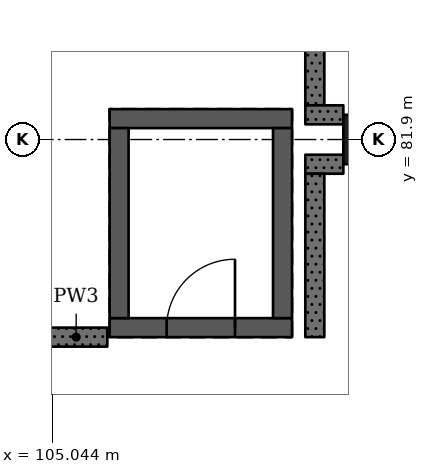
"""IFC4 building model, lengths in metres.
Left out: names, types, materials, properties, quantities, classifications, styles, units other than length and angle.
Written with IfcOpenShell. Run it as: python <this file> out.ifc"""

import sys

from ifc_helpers import new_model, si_unit, direction, frame, frame_2d, origin, origin_2d, place, context, subcontext, project, spatial, rectangle, extrude, element, fill, save


model = new_model("IFC4")
c1 = context("Model", 3, precision=1e-05, world=origin(), true_north=direction((0.0, 1.0)))
c2 = subcontext(c1, "Body", "Model", "MODEL_VIEW")
j1 = project(units=[si_unit("LENGTHUNIT", "METRE"), si_unit("PLANEANGLEUNIT", "RADIAN")], contexts=[c1])
p1 = place(None, origin())
s1 = spatial("IfcSite", under=j1, at=p1, CompositionType="ELEMENT")
p2 = place(p1, origin())
s2 = spatial("IfcBuilding", under=s1, at=p2, CompositionType="ELEMENT")
p3 = place(p2, frame((0.0, 0.0, 15.47)))
s3 = spatial("IfcBuildingStorey", under=s2, at=p3, CompositionType="ELEMENT", Elevation=15.47)
p4 = place(p3, frame((109.2, 81.9, 0.0), z_axis=(0.0, 0.0, 1.0), x_axis=(1.0, 0.0, 0.0)))
e1 = element("IfcColumn", 1, at=p4, inside=s3, PredefinedType="COLUMN", context=c2, shape_type="SweptSolid", body=[
    extrude(rectangle(XDim=0.65, YDim=0.65, at=origin_2d()), origin(), (0.0, 0.0, 1.0), 4.55),
])
p5 = place(p3, frame((108.2, 79.425, 0.0), z_axis=(0.0, 0.0, 1.0), x_axis=(-1.0, 0.0, 0.0)))
e2 = element("IfcWall", 2, at=p5, inside=s3, PredefinedType="SHEAR", context=c2, shape_type="SweptSolid", body=[
    extrude(rectangle(XDim=2.4, YDim=0.25, at=frame_2d((1.2, 0.0))), origin(), (0.0, 0.0, 1.0), 4.55),
])
p6 = place(p5, frame((0.75, 0.0, 0.0)))
e3 = element("IfcOpeningElement", 3, at=p6, cuts=e2, PredefinedType="OPENING", context=c2, shape_type="SweptSolid", body=[
    extrude(rectangle(XDim=0.9, YDim=2.1, at=frame_2d((0.45, 1.05))), frame((0.0, 0.135, 0.0), z_axis=(0.0, -1.0, 0.0), x_axis=(1.0, 0.0, 0.0)), (0.0, 0.0, 1.0), 0.27),
])
p7 = place(p3, frame((108.2, 82.175, 0.0), z_axis=(0.0, 0.0, 1.0), x_axis=(-1.0, 0.0, 0.0)))
e4 = element("IfcWall", 4, at=p7, inside=s3, PredefinedType="SHEAR", context=c2, shape_type="SweptSolid", body=[
    extrude(rectangle(XDim=2.4, YDim=0.25, at=frame_2d((1.2, 0.0))), origin(), (0.0, 0.0, 1.0), 4.55),
])
for number, where, z_axis, x_axis in (
    (5, (105.925, 82.05, 0.0), (0.0, 0.0, 1.0), (0.0, -1.0, 0.0)),
    (6, (108.075, 82.05, 0.0), (0.0, 0.0, 1.0), (0.0, -1.0, 0.0)),
):
    element("IfcWall", number, at=place(p3, frame(where, z_axis=z_axis, x_axis=x_axis)), inside=s3, PredefinedType="SHEAR", context=c2, shape_type="SweptSolid", body=[
        extrude(rectangle(XDim=2.5, YDim=0.25, at=frame_2d((1.25, 0.0))), origin(), (0.0, 0.0, 1.0), 4.55),
    ])
p8 = place(p3, frame((105.77, 79.3, 0.0), z_axis=(0.0, 0.0, 1.0), x_axis=(-1.0, 0.0, 0.0)))
e7 = element("IfcWall", 7, at=p8, inside=s3, PredefinedType="SOLIDWALL", context=c2, shape_type="SweptSolid", body=[
    extrude(rectangle(XDim=0.82, YDim=0.25, at=frame_2d((0.41, 0.0))), origin(), (0.0, 0.0, 1.0), 4.3),
])
p9 = place(p3, frame((108.375, 81.575, 0.0), z_axis=(0.0, 0.0, 1.0), x_axis=(1.0, 0.0, 0.0)))
e8 = element("IfcWall", 8, at=p9, inside=s3, PredefinedType="SOLIDWALL", context=c2, shape_type="SweptSolid", body=[
    extrude(rectangle(XDim=0.5, YDim=0.25, at=frame_2d((0.25, 0.0))), origin(), (0.0, 0.0, 1.0), 4.3),
])
p10 = place(p3, frame((108.5, 79.3, 0.0), z_axis=(0.0, 0.0, 1.0), x_axis=(0.0, 1.0, 0.0)))
e9 = element("IfcWall", 9, at=p10, inside=s3, PredefinedType="SOLIDWALL", context=c2, shape_type="SweptSolid", body=[
    extrude(rectangle(XDim=2.15, YDim=0.25, at=frame_2d((1.075, 0.0))), origin(), (0.0, 0.0, 1.0), 4.3),
])
p11 = place(p3, frame((108.5, 82.35, 0.0), z_axis=(0.0, 0.0, 1.0), x_axis=(0.0, 1.0, 0.0)))
e10 = element("IfcWall", 10, at=p11, inside=s3, PredefinedType="SOLIDWALL", context=c2, shape_type="SweptSolid", body=[
    extrude(rectangle(XDim=6.925, YDim=0.25, at=frame_2d((3.462, 0.0))), origin(), (0.0, 0.0, 1.0), 4.3),
])
p12 = place(p3, frame((108.875, 82.225, 0.0), z_axis=(0.0, 0.0, 1.0), x_axis=(-1.0, 0.0, 0.0)))
e11 = element("IfcWall", 11, at=p12, inside=s3, PredefinedType="SOLIDWALL", context=c2, shape_type="SweptSolid", body=[
    extrude(rectangle(XDim=0.5, YDim=0.25, at=frame_2d((0.25, 0.0))), origin(), (0.0, 0.0, 1.0), 4.3),
])
p13 = place(p6, origin())
e12 = element("IfcDoor", 12, at=p13, inside=s3, OperationType="SINGLE_SWING_LEFT", PredefinedType="DOOR", context=c2, shape_type="SweptSolid", body=[
    extrude(rectangle(XDim=0.9, YDim=2.1, at=frame_2d((0.45, 1.05))), frame((0.0, 0.025, 0.0), z_axis=(0.0, -1.0, 0.0), x_axis=(1.0, 0.0, 0.0)), (0.0, 0.0, 1.0), 0.05),
])
fill(e3, e12)
save(model, sys.argv[1])
